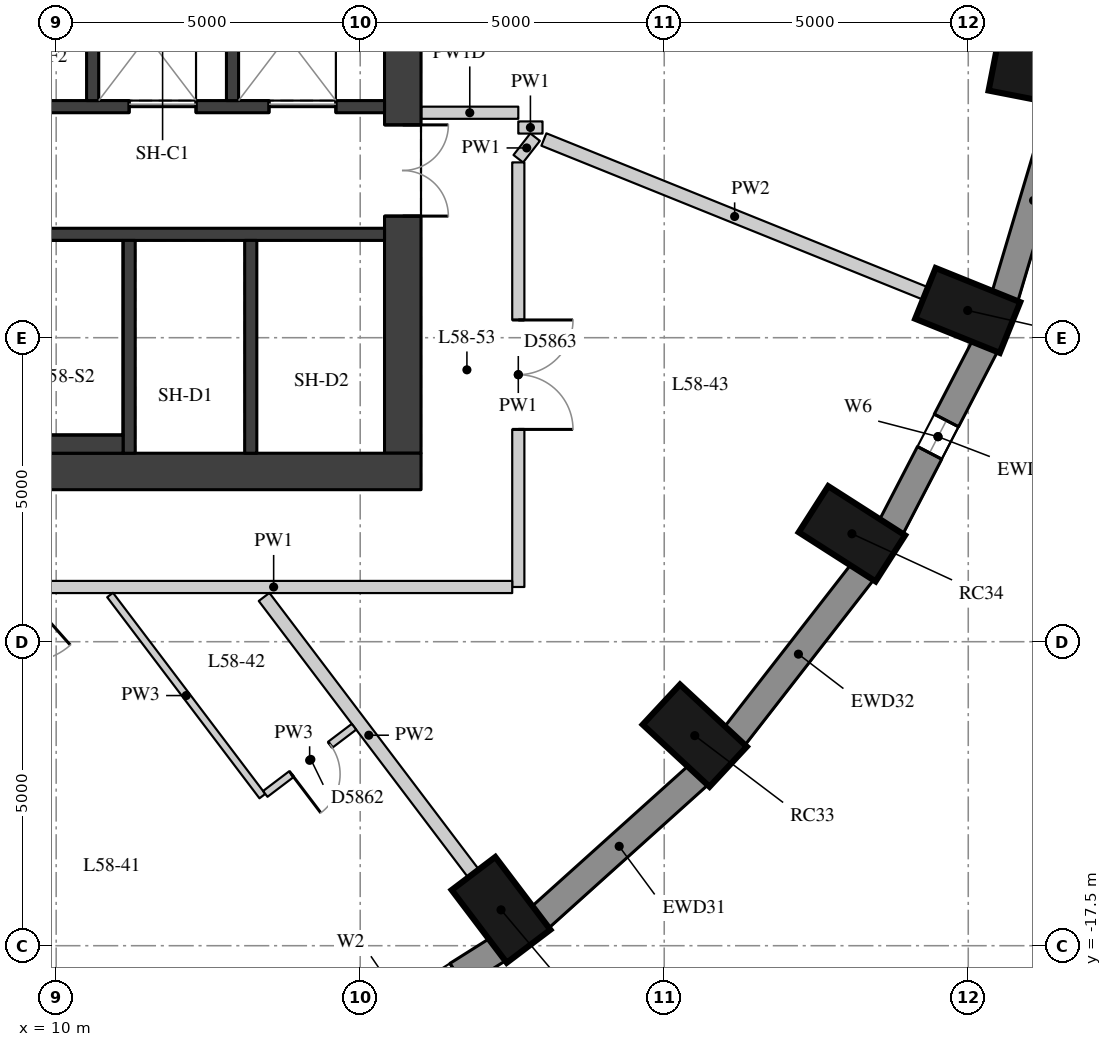
"""IFC4 building model, lengths in metres.
Left out: names, types, materials, properties, quantities, classifications, styles, units other than length and angle.
Written with IfcOpenShell. Run it as: python <this file> out.ifc"""

import sys

from ifc_helpers import new_model, si_unit, direction, frame, frame_2d, origin, origin_2d, place, context, subcontext, project, spatial, rectangle, extrude, element, fill, save


model = new_model("IFC4")
c1 = context("Model", 3, precision=1e-05, world=origin(), true_north=direction((0.0, 1.0)))
c2 = subcontext(c1, "Body", "Model", "MODEL_VIEW")
j1 = project(units=[si_unit("LENGTHUNIT", "METRE"), si_unit("PLANEANGLEUNIT", "RADIAN")], contexts=[c1])
p1 = place(None, origin())
s1 = spatial("IfcSite", under=j1, at=p1, CompositionType="ELEMENT")
p2 = place(p1, origin())
s2 = spatial("IfcBuilding", under=s1, at=p2, CompositionType="ELEMENT")
p3 = place(p2, frame((0.0, 0.0, 205.7)))
s3 = spatial("IfcBuildingStorey", under=s2, at=p3, CompositionType="ELEMENT", Elevation=205.7)
for number, where, z_axis, x_axis in (
    (1, (17.316, -16.911, 0.0), (0.0, 0.0, 1.0), (0.604, -0.797, 0.0)),
    (2, (20.502, -14.045, 0.0), (0.0, 0.0, 1.0), (0.732, -0.681, 0.0)),
    (3, (23.087, -10.725, 0.0), (0.0, 0.0, 1.0), (0.842, -0.539, 0.0)),
    (4, (24.991, -7.052, 0.0), (0.0, 0.0, 1.0), (0.927, -0.374, 0.0)),
    (5, (26.157, -3.137, 0.0), (0.0, 0.0, 1.0), (0.981, -0.192, 0.0)),
):
    element("IfcColumn", number, at=place(p3, frame(where, z_axis=z_axis, x_axis=x_axis)), inside=s3, PredefinedType="COLUMN", context=c2, shape_type="SweptSolid", body=[
        extrude(rectangle(XDim=1.5, YDim=0.9, at=origin_2d()), origin(), (0.0, 0.0, 1.0), 3.3),
    ])
p4 = place(p3, frame((14.232, -19.47, 0.0), z_axis=(0.0, 0.0, 1.0), x_axis=(0.84614984472, 0.532945063098, 0.0)))
e6 = element("IfcWall", 6, at=p4, inside=s3, PredefinedType="SOLIDWALL", context=c2, shape_type="SweptSolid", body=[
    extrude(rectangle(XDim=3.586, YDim=0.45, at=frame_2d((1.793, 0.0))), origin(), (0.0, 0.0, 1.0), 3.02),
])
p5 = place(p4, frame((0.793, 0.0, 0.4)))
e7 = element("IfcOpeningElement", 7, at=p5, cuts=e6, PredefinedType="OPENING", context=c2, shape_type="SweptSolid", body=[
    extrude(rectangle(XDim=2.0, YDim=1.75, at=frame_2d((1.0, 0.875))), frame((0.0, 0.235, 0.0), z_axis=(0.0, -1.0, 0.0), x_axis=(1.0, 0.0, 0.0)), (0.0, 0.0, 1.0), 0.47),
])
p6 = place(p3, frame((17.953, -17.04, 0.0), z_axis=(0.0, 0.0, 1.0), x_axis=(0.743442727602, 0.668799604348, 0.0)))
e8 = element("IfcWall", 8, at=p6, inside=s3, PredefinedType="SOLIDWALL", context=c2, shape_type="SweptSolid", body=[
    extrude(rectangle(XDim=3.513, YDim=0.45, at=frame_2d((1.756, 0.0))), origin(), (0.0, 0.0, 1.0), 3.02),
])
p7 = place(p3, frame((21.151, -14.061, 0.0), z_axis=(0.0, 0.0, 1.0), x_axis=(0.614255239631, 0.789107407509, 0.0)))
e9 = element("IfcWall", 9, at=p7, inside=s3, PredefinedType="SOLIDWALL", context=c2, shape_type="SweptSolid", body=[
    extrude(rectangle(XDim=3.438, YDim=0.45, at=frame_2d((1.719, 0.0))), origin(), (0.0, 0.0, 1.0), 3.02),
])
p8 = place(p3, frame((23.727, -10.624, 0.0), z_axis=(0.0, 0.0, 1.0), x_axis=(0.460175500475, 0.887827972505, 0.0)))
e10 = element("IfcWall", 10, at=p8, inside=s3, PredefinedType="SOLIDWALL", context=c2, shape_type="SweptSolid", body=[
    extrude(rectangle(XDim=3.371, YDim=0.45, at=frame_2d((1.685, 0.0))), origin(), (0.0, 0.0, 1.0), 3.02),
])
p9 = place(p8, frame((1.385, 0.0, 0.4)))
e11 = element("IfcOpeningElement", 11, at=p9, cuts=e10, PredefinedType="OPENING", context=c2, shape_type="SweptSolid", body=[
    extrude(rectangle(XDim=0.6, YDim=1.75, at=frame_2d((0.3, 0.875))), frame((0.0, 0.235, 0.0), z_axis=(0.0, -1.0, 0.0), x_axis=(1.0, 0.0, 0.0)), (0.0, 0.0, 1.0), 0.47),
])
p10 = place(p3, frame((25.6, -6.834, 0.0), z_axis=(0.0, 0.0, 1.0), x_axis=(0.285444972963, 0.958395099847, 0.0)))
e12 = element("IfcWall", 12, at=p10, inside=s3, PredefinedType="SOLIDWALL", context=c2, shape_type="SweptSolid", body=[
    extrude(rectangle(XDim=3.32, YDim=0.45, at=frame_2d((1.66, 0.0))), origin(), (0.0, 0.0, 1.0), 3.02),
])
p11 = place(p3, frame((15.7, -9.4, 0.0), z_axis=(0.0, 0.0, 1.0), x_axis=(0.0, 1.0, 0.0)))
e13 = element("IfcWall", 13, at=p11, inside=s3, PredefinedType="SHEAR", context=c2, shape_type="SweptSolid", body=[
    extrude(rectangle(XDim=18.8, YDim=0.6, at=frame_2d((9.4, 0.0))), origin(), (0.0, 0.0, 1.0), 3.02),
])
p12 = place(p11, frame((13.4, 0.0, 0.0)))
e14 = element("IfcOpeningElement", 14, at=p12, cuts=e13, PredefinedType="OPENING", context=c2, shape_type="SweptSolid", body=[
    extrude(rectangle(XDim=1.5, YDim=2.1, at=frame_2d((0.75, 1.05))), frame((0.0, 0.31, 0.0), z_axis=(0.0, -1.0, 0.0), x_axis=(1.0, 0.0, 0.0)), (0.0, 0.0, 1.0), 0.62),
])
p13 = place(p11, frame((3.9, 0.0, 0.0)))
e15 = element("IfcOpeningElement", 15, at=p13, cuts=e13, PredefinedType="OPENING", context=c2, shape_type="SweptSolid", body=[
    extrude(rectangle(XDim=1.5, YDim=2.1, at=frame_2d((0.75, 1.05))), frame((0.0, 0.31, 0.0), z_axis=(0.0, -1.0, 0.0), x_axis=(1.0, 0.0, 0.0)), (0.0, 0.0, 1.0), 0.62),
])
p14 = place(p3, frame((4.0, -9.7, 0.0), z_axis=(0.0, 0.0, 1.0), x_axis=(1.0, 0.0, 0.0)))
e16 = element("IfcWall", 16, at=p14, inside=s3, PredefinedType="SHEAR", context=c2, shape_type="SweptSolid", body=[
    extrude(rectangle(XDim=12.0, YDim=0.6, at=frame_2d((6.0, 0.0))), origin(), (0.0, 0.0, 1.0), 3.02),
])
p15 = place(p3, frame((4.6, -3.7, 0.0), z_axis=(0.0, 0.0, 1.0), x_axis=(1.0, 0.0, 0.0)))
e17 = element("IfcWall", 17, at=p15, inside=s3, PredefinedType="SHEAR", context=c2, shape_type="SweptSolid", body=[
    extrude(rectangle(XDim=10.8, YDim=0.2, at=frame_2d((5.4, 0.0))), origin(), (0.0, 0.0, 1.0), 3.02),
])
p16 = place(p15, frame((6.6, 0.0, 0.0)))
e18 = element("IfcOpeningElement", 18, at=p16, cuts=e17, PredefinedType="OPENING", context=c2, shape_type="SweptSolid", body=[
    extrude(rectangle(XDim=1.1, YDim=2.1, at=frame_2d((0.55, 1.05))), frame((0.0, 0.11, 0.0), z_axis=(0.0, -1.0, 0.0), x_axis=(1.0, 0.0, 0.0)), (0.0, 0.0, 1.0), 0.22),
])
p17 = place(p15, frame((8.9, 0.0, 0.0)))
e19 = element("IfcOpeningElement", 19, at=p17, cuts=e17, PredefinedType="OPENING", context=c2, shape_type="SweptSolid", body=[
    extrude(rectangle(XDim=1.1, YDim=2.1, at=frame_2d((0.55, 1.05))), frame((0.0, 0.11, 0.0), z_axis=(0.0, -1.0, 0.0), x_axis=(1.0, 0.0, 0.0)), (0.0, 0.0, 1.0), 0.22),
])
p18 = place(p3, frame((4.6, -5.8, 0.0), z_axis=(0.0, 0.0, 1.0), x_axis=(1.0, 0.0, 0.0)))
e20 = element("IfcWall", 20, at=p18, inside=s3, PredefinedType="SHEAR", context=c2, shape_type="SweptSolid", body=[
    extrude(rectangle(XDim=10.8, YDim=0.2, at=frame_2d((5.4, 0.0))), origin(), (0.0, 0.0, 1.0), 3.02),
])
for number, where, z_axis, x_axis in (
    (21, (11.2, -9.4, 0.0), (0.0, 0.0, 1.0), (0.0, 1.0, 0.0)),
    (22, (13.2, -9.4, 0.0), (0.0, 0.0, 1.0), (0.0, 1.0, 0.0)),
):
    element("IfcWall", number, at=place(p3, frame(where, z_axis=z_axis, x_axis=x_axis)), inside=s3, PredefinedType="SHEAR", context=c2, shape_type="SweptSolid", body=[
        extrude(rectangle(XDim=3.5, YDim=0.2, at=frame_2d((1.75, 0.0))), origin(), (0.0, 0.0, 1.0), 3.02),
    ])
for number, where, z_axis, x_axis in (
    (23, (10.6, -3.6, 0.0), (0.0, 0.0, 1.0), (0.0, 1.0, 0.0)),
    (24, (12.9, -3.6, 0.0), (0.0, 0.0, 1.0), (0.0, 1.0, 0.0)),
):
    element("IfcWall", number, at=place(p3, frame(where, z_axis=z_axis, x_axis=x_axis)), inside=s3, PredefinedType="SHEAR", context=c2, shape_type="SweptSolid", body=[
        extrude(rectangle(XDim=2.5, YDim=0.2, at=frame_2d((1.25, 0.0))), origin(), (0.0, 0.0, 1.0), 3.02),
    ])
p19 = place(p3, frame((6.22, -9.25, 0.0), z_axis=(0.0, 0.0, 1.0), x_axis=(1.0, 0.0, 0.0)))
e25 = element("IfcWall", 25, at=p19, inside=s3, PredefinedType="PARTITIONING", context=c2, shape_type="SweptSolid", body=[
    extrude(rectangle(XDim=4.88, YDim=0.3, at=frame_2d((2.44, 0.0))), origin(), (0.0, 0.0, 1.0), 3.02),
])
p20 = place(p3, frame((17.6, -4.043, 0.0), z_axis=(0.0, 0.0, 1.0), x_axis=(1.0, 0.0, 0.0)))
e26 = element("IfcWall", 26, at=p20, inside=s3, PredefinedType="PARTITIONING", context=c2, shape_type="SweptSolid", body=[
    extrude(rectangle(XDim=0.398, YDim=0.2, at=frame_2d((0.199, 0.0))), origin(), (0.0, 0.0, 1.0), 3.02),
])
p21 = place(p3, frame((17.876, -4.201, 0.0), z_axis=(0.0, 0.0, 1.0), x_axis=(-0.61405326993, -0.789264582816, 0.0)))
e27 = element("IfcWall", 27, at=p21, inside=s3, PredefinedType="PARTITIONING", context=c2, shape_type="SweptSolid", body=[
    extrude(rectangle(XDim=0.45, YDim=0.2, at=frame_2d((0.225, 0.0))), origin(), (0.0, 0.0, 1.0), 3.02),
])
p22 = place(p3, frame((17.6, -4.617, 0.0), z_axis=(0.0, 0.0, 1.0), x_axis=(0.0, -1.0, 0.0)))
e28 = element("IfcWall", 28, at=p22, inside=s3, PredefinedType="PARTITIONING", context=c2, shape_type="SweptSolid", body=[
    extrude(rectangle(XDim=6.983, YDim=0.2, at=frame_2d((3.492, 0.0))), origin(), (0.0, 0.0, 1.0), 3.02),
])
p23 = place(p22, frame((2.592, 0.0, 0.0)))
e29 = element("IfcOpeningElement", 29, at=p23, cuts=e28, PredefinedType="OPENING", context=c2, shape_type="SweptSolid", body=[
    extrude(rectangle(XDim=1.8, YDim=2.1, at=frame_2d((0.9, 1.05))), frame((0.0, 0.11, 0.0), z_axis=(0.0, -1.0, 0.0), x_axis=(1.0, 0.0, 0.0)), (0.0, 0.0, 1.0), 0.22),
])
p24 = place(p3, frame((17.5, -11.6, 0.0), z_axis=(0.0, 0.0, 1.0), x_axis=(-1.0, 0.0, 0.0)))
e30 = element("IfcWall", 30, at=p24, inside=s3, PredefinedType="PARTITIONING", context=c2, shape_type="SweptSolid", body=[
    extrude(rectangle(XDim=7.847, YDim=0.2, at=frame_2d((3.923, 0.0))), origin(), (0.0, 0.0, 1.0), 3.02),
])
p25 = place(p3, frame((16.004, -3.8, 0.0), z_axis=(0.0, 0.0, 1.0), x_axis=(1.0, 0.0, 0.0)))
e31 = element("IfcWall", 31, at=p25, inside=s3, PredefinedType="PARTITIONING", context=c2, shape_type="SweptSolid", body=[
    extrude(rectangle(XDim=1.596, YDim=0.2, at=frame_2d((0.798, 0.0))), origin(), (0.0, 0.0, 1.0), 2.47),
])
p26 = place(p3, frame((16.863, -16.312, 0.0), z_axis=(0.0, 0.0, 1.0), x_axis=(-0.603636051313, 0.797260006243, 0.0)))
e32 = element("IfcWall", 32, at=p26, inside=s3, PredefinedType="PARTITIONING", context=c2, shape_type="SweptSolid", body=[
    extrude(rectangle(XDim=5.706, YDim=0.22, at=frame_2d((2.853, 0.0))), origin(), (0.0, 0.0, 1.0), 3.02),
])
p27 = place(p3, frame((24.295, -6.771, 0.0), z_axis=(0.0, 0.0, 1.0), x_axis=(-0.927382720906, 0.374114005305, 0.0)))
e33 = element("IfcWall", 33, at=p27, inside=s3, PredefinedType="PARTITIONING", context=c2, shape_type="SweptSolid", body=[
    extrude(rectangle(XDim=6.766, YDim=0.22, at=frame_2d((3.383, 0.0))), origin(), (0.0, 0.0, 1.0), 3.02),
])
p28 = place(p3, frame((10.887, -11.732, 0.0), z_axis=(0.0, 0.0, 1.0), x_axis=(0.603646932038, -0.797251767913, 0.0)))
e34 = element("IfcWall", 34, at=p28, inside=s3, PredefinedType="PARTITIONING", context=c2, shape_type="SweptSolid", body=[
    extrude(rectangle(XDim=4.149, YDim=0.12, at=frame_2d((2.074, 0.0))), origin(), (0.0, 0.0, 1.0), 3.02),
])
p29 = place(p3, frame((13.439, -15.003, 0.0), z_axis=(0.0, 0.0, 1.0), x_axis=(0.797238062708, 0.603665032422, 0.0)))
e35 = element("IfcWall", 35, at=p29, inside=s3, PredefinedType="PARTITIONING", context=c2, shape_type="SweptSolid", body=[
    extrude(rectangle(XDim=1.83, YDim=0.12, at=frame_2d((0.915, 0.0))), origin(), (0.0, 0.0, 1.0), 3.02),
])
p30 = place(p29, frame((0.54, 0.0, 0.0)))
e36 = element("IfcOpeningElement", 36, at=p30, cuts=e35, PredefinedType="OPENING", context=c2, shape_type="SweptSolid", body=[
    extrude(rectangle(XDim=0.8, YDim=2.1, at=frame_2d((0.4, 1.05))), frame((0.0, 0.07, 0.0), z_axis=(0.0, -1.0, 0.0), x_axis=(1.0, 0.0, 0.0)), (0.0, 0.0, 1.0), 0.14),
])
p31 = place(p9, origin())
e37 = element("IfcWindow", 37, at=p31, inside=s3, PartitioningType="SINGLE_PANEL", PredefinedType="WINDOW", context=c2, shape_type="SweptSolid", body=[
    extrude(rectangle(XDim=0.6, YDim=1.75, at=frame_2d((0.3, 0.875))), frame((0.0, 0.035, 0.0), z_axis=(0.0, -1.0, 0.0), x_axis=(1.0, 0.0, 0.0)), (0.0, 0.0, 1.0), 0.06),
])
fill(e11, e37)
p32 = place(p13, origin())
e38 = element("IfcDoor", 38, at=p32, inside=s3, OperationType="DOUBLE_DOOR_SINGLE_SWING", PredefinedType="DOOR", context=c2, shape_type="SweptSolid", body=[
    extrude(rectangle(XDim=1.5, YDim=2.1, at=frame_2d((0.75, 1.05))), frame((0.0, 0.025, 0.0), z_axis=(0.0, -1.0, 0.0), x_axis=(1.0, 0.0, 0.0)), (0.0, 0.0, 1.0), 0.05),
])
fill(e15, e38)
p33 = place(p16, origin())
e39 = element("IfcDoor", 39, at=p33, inside=s3, OperationType="DOUBLE_DOOR_SLIDING", PredefinedType="DOOR", context=c2, shape_type="SweptSolid", body=[
    extrude(rectangle(XDim=1.1, YDim=2.1, at=frame_2d((0.55, 1.05))), frame((0.0, 0.025, 0.0), z_axis=(0.0, -1.0, 0.0), x_axis=(1.0, 0.0, 0.0)), (0.0, 0.0, 1.0), 0.05),
])
fill(e18, e39)
p34 = place(p17, origin())
e40 = element("IfcDoor", 40, at=p34, inside=s3, OperationType="DOUBLE_DOOR_SLIDING", PredefinedType="DOOR", context=c2, shape_type="SweptSolid", body=[
    extrude(rectangle(XDim=1.1, YDim=2.1, at=frame_2d((0.55, 1.05))), frame((0.0, 0.025, 0.0), z_axis=(0.0, -1.0, 0.0), x_axis=(1.0, 0.0, 0.0)), (0.0, 0.0, 1.0), 0.05),
])
fill(e19, e40)
p35 = place(p30, origin())
e41 = element("IfcDoor", 41, at=p35, inside=s3, OperationType="SINGLE_SWING_RIGHT", PredefinedType="DOOR", context=c2, shape_type="SweptSolid", body=[
    extrude(rectangle(XDim=0.8, YDim=2.1, at=frame_2d((0.4, 1.05))), frame((0.0, 0.025, 0.0), z_axis=(0.0, -1.0, 0.0), x_axis=(1.0, 0.0, 0.0)), (0.0, 0.0, 1.0), 0.05),
])
fill(e36, e41)
p36 = place(p23, origin())
e42 = element("IfcDoor", 42, at=p36, inside=s3, OperationType="DOUBLE_DOOR_SINGLE_SWING", PredefinedType="DOOR", context=c2, shape_type="SweptSolid", body=[
    extrude(rectangle(XDim=1.8, YDim=2.1, at=frame_2d((0.9, 1.05))), frame((0.0, 0.025, 0.0), z_axis=(0.0, -1.0, 0.0), x_axis=(1.0, 0.0, 0.0)), (0.0, 0.0, 1.0), 0.05),
])
fill(e29, e42)
save(model, sys.argv[1])
